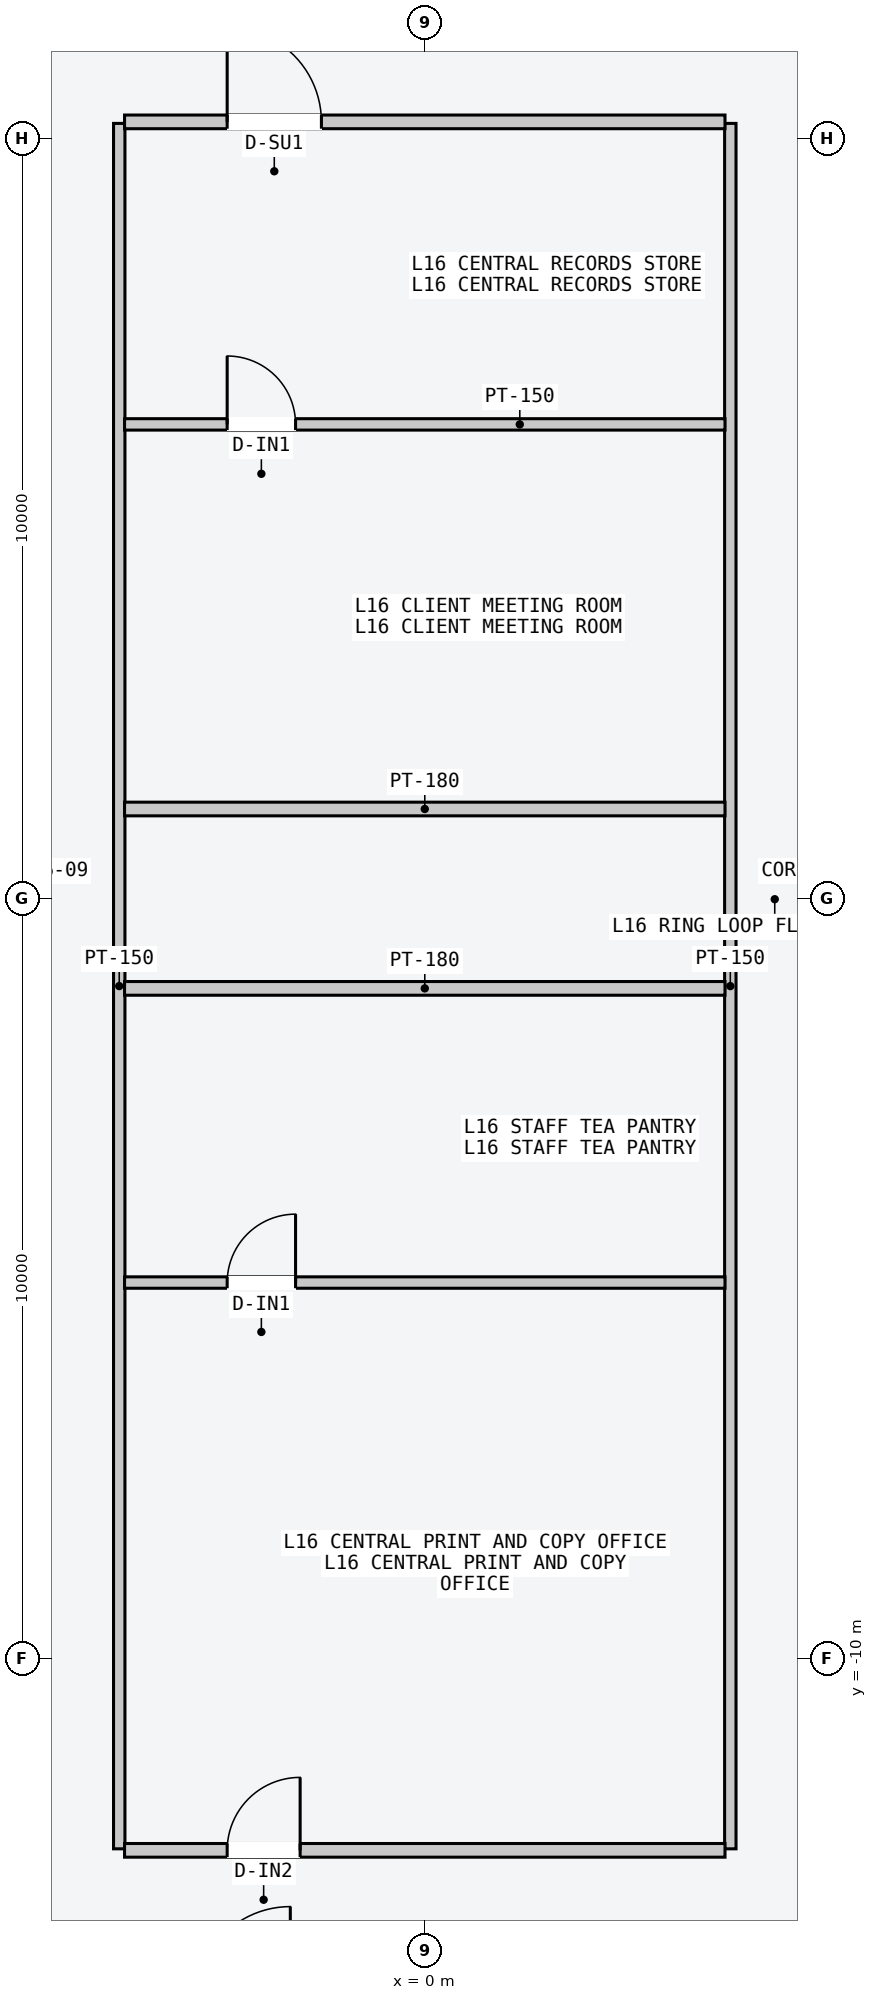
"""IFC4 building model, lengths in metres.
Left out: names, types, materials, properties, quantities, classifications, styles, units other than length and angle.
Written with IfcOpenShell. Run it as: python <this file> out.ifc"""

import sys

from ifc_helpers import new_model, si_unit, direction, frame, frame_2d, origin, place, context, subcontext, project, spatial, rectangle, extrude, element, fill, save


model = new_model("IFC4")
c1 = context("Model", 3, precision=1e-05, world=origin(), true_north=direction((0.0, 1.0)))
c2 = subcontext(c1, "Body", "Model", "MODEL_VIEW")
j1 = project(units=[si_unit("LENGTHUNIT", "METRE"), si_unit("PLANEANGLEUNIT", "RADIAN")], contexts=[c1])
p1 = place(None, origin())
s1 = spatial("IfcSite", under=j1, at=p1, CompositionType="ELEMENT")
p2 = place(p1, origin())
s2 = spatial("IfcBuilding", under=s1, at=p2, CompositionType="ELEMENT")
p3 = place(p2, frame((0.0, 0.0, 63.6)))
s3 = spatial("IfcBuildingStorey", under=s2, at=p3, CompositionType="ELEMENT", Elevation=63.6)
for number, where, z_axis, x_axis in (
    (1, (-4.02, -12.5, 0.0), (0.0, 0.0, 1.0), (0.0, 1.0, 0.0)),
    (2, (4.02, -12.5, 0.0), (0.0, 0.0, 1.0), (0.0, 1.0, 0.0)),
):
    element("IfcWall", number, at=place(p3, frame(where, z_axis=z_axis, x_axis=x_axis)), inside=s3, PredefinedType="PARTITIONING", context=c2, shape_type="SweptSolid", body=[
        extrude(rectangle(XDim=22.7, YDim=0.15, at=frame_2d((11.35, 0.0))), origin(), (0.0, 0.0, 1.0), 3.4),
    ])
p4 = place(p3, frame((-3.95, 1.18, 0.0), z_axis=(0.0, 0.0, 1.0), x_axis=(1.0, 0.0, 0.0)))
e3 = element("IfcWall", 3, at=p4, inside=s3, PredefinedType="PARTITIONING", context=c2, shape_type="SweptSolid", body=[
    extrude(rectangle(XDim=7.9, YDim=0.18, at=frame_2d((3.95, 0.0))), origin(), (0.0, 0.0, 1.0), 3.4),
])
p5 = place(p3, frame((-3.95, 10.22, 0.0), z_axis=(0.0, 0.0, 1.0), x_axis=(1.0, 0.0, 0.0)))
e4 = element("IfcWall", 4, at=p5, inside=s3, PredefinedType="PARTITIONING", context=c2, shape_type="SweptSolid", body=[
    extrude(rectangle(XDim=7.9, YDim=0.18, at=frame_2d((3.95, 0.0))), origin(), (0.0, 0.0, 1.0), 3.4),
])
p6 = place(p5, frame((1.35, 0.0, 0.0)))
e5 = element("IfcOpeningElement", 5, at=p6, cuts=e4, PredefinedType="OPENING", context=c2, shape_type="SweptSolid", body=[
    extrude(rectangle(XDim=1.24, YDim=2.24, at=frame_2d((0.62, 1.12))), frame((0.0, 0.1, 0.0), z_axis=(0.0, -1.0, 0.0), x_axis=(1.0, 0.0, 0.0)), (0.0, 0.0, 1.0), 0.2),
])
p7 = place(p3, frame((-3.95, -1.18, 0.0), z_axis=(0.0, 0.0, 1.0), x_axis=(1.0, 0.0, 0.0)))
e6 = element("IfcWall", 6, at=p7, inside=s3, PredefinedType="PARTITIONING", context=c2, shape_type="SweptSolid", body=[
    extrude(rectangle(XDim=7.9, YDim=0.18, at=frame_2d((3.95, 0.0))), origin(), (0.0, 0.0, 1.0), 3.4),
])
p8 = place(p3, frame((-3.95, -12.52, 0.0), z_axis=(0.0, 0.0, 1.0), x_axis=(1.0, 0.0, 0.0)))
e7 = element("IfcWall", 7, at=p8, inside=s3, PredefinedType="PARTITIONING", context=c2, shape_type="SweptSolid", body=[
    extrude(rectangle(XDim=7.9, YDim=0.18, at=frame_2d((3.95, 0.0))), origin(), (0.0, 0.0, 1.0), 3.4),
])
p9 = place(p8, frame((1.35, 0.0, 0.0)))
e8 = element("IfcOpeningElement", 8, at=p9, cuts=e7, PredefinedType="OPENING", context=c2, shape_type="SweptSolid", body=[
    extrude(rectangle(XDim=0.96, YDim=2.18, at=frame_2d((0.48, 1.09))), frame((0.0, 0.1, 0.0), z_axis=(0.0, -1.0, 0.0), x_axis=(1.0, 0.0, 0.0)), (0.0, 0.0, 1.0), 0.2),
])
p10 = place(p3, frame((-3.95, 6.24, 0.0), z_axis=(0.0, 0.0, 1.0), x_axis=(1.0, 0.0, 0.0)))
e9 = element("IfcWall", 9, at=p10, inside=s3, PredefinedType="PARTITIONING", context=c2, shape_type="SweptSolid", body=[
    extrude(rectangle(XDim=7.9, YDim=0.15, at=frame_2d((3.95, 0.0))), origin(), (0.0, 0.0, 1.0), 3.4),
])
p11 = place(p10, frame((1.35, 0.0, 0.0)))
e10 = element("IfcOpeningElement", 10, at=p11, cuts=e9, PredefinedType="OPENING", context=c2, shape_type="SweptSolid", body=[
    extrude(rectangle(XDim=0.9, YDim=2.15, at=frame_2d((0.45, 1.075))), frame((0.0, 0.085, 0.0), z_axis=(0.0, -1.0, 0.0), x_axis=(1.0, 0.0, 0.0)), (0.0, 0.0, 1.0), 0.17),
])
p12 = place(p3, frame((-3.95, -5.05, 0.0), z_axis=(0.0, 0.0, 1.0), x_axis=(1.0, 0.0, 0.0)))
e11 = element("IfcWall", 11, at=p12, inside=s3, PredefinedType="PARTITIONING", context=c2, shape_type="SweptSolid", body=[
    extrude(rectangle(XDim=7.9, YDim=0.15, at=frame_2d((3.95, 0.0))), origin(), (0.0, 0.0, 1.0), 3.4),
])
p13 = place(p12, frame((1.35, 0.0, 0.0)))
e12 = element("IfcOpeningElement", 12, at=p13, cuts=e11, PredefinedType="OPENING", context=c2, shape_type="SweptSolid", body=[
    extrude(rectangle(XDim=0.9, YDim=2.15, at=frame_2d((0.45, 1.075))), frame((0.0, 0.085, 0.0), z_axis=(0.0, -1.0, 0.0), x_axis=(1.0, 0.0, 0.0)), (0.0, 0.0, 1.0), 0.17),
])
p14 = place(p6, origin())
e13 = element("IfcDoor", 13, at=p14, inside=s3, OperationType="SINGLE_SWING_LEFT", PredefinedType="DOOR", context=c2, shape_type="SweptSolid", body=[
    extrude(rectangle(XDim=1.24, YDim=2.24, at=frame_2d((0.62, 1.12))), frame((0.0, 0.025, 0.0), z_axis=(0.0, -1.0, 0.0), x_axis=(1.0, 0.0, 0.0)), (0.0, 0.0, 1.0), 0.05),
])
fill(e5, e13)
p15 = place(p9, origin())
e14 = element("IfcDoor", 14, at=p15, inside=s3, OperationType="SINGLE_SWING_RIGHT", PredefinedType="DOOR", context=c2, shape_type="SweptSolid", body=[
    extrude(rectangle(XDim=0.96, YDim=2.18, at=frame_2d((0.48, 1.09))), frame((0.0, 0.025, 0.0), z_axis=(0.0, -1.0, 0.0), x_axis=(1.0, 0.0, 0.0)), (0.0, 0.0, 1.0), 0.05),
])
fill(e8, e14)
p16 = place(p11, origin())
e15 = element("IfcDoor", 15, at=p16, inside=s3, OperationType="SINGLE_SWING_LEFT", PredefinedType="DOOR", context=c2, shape_type="SweptSolid", body=[
    extrude(rectangle(XDim=0.9, YDim=2.15, at=frame_2d((0.45, 1.075))), frame((0.0, 0.025, 0.0), z_axis=(0.0, -1.0, 0.0), x_axis=(1.0, 0.0, 0.0)), (0.0, 0.0, 1.0), 0.05),
])
fill(e10, e15)
p17 = place(p13, origin())
e16 = element("IfcDoor", 16, at=p17, inside=s3, OperationType="SINGLE_SWING_RIGHT", PredefinedType="DOOR", context=c2, shape_type="SweptSolid", body=[
    extrude(rectangle(XDim=0.9, YDim=2.15, at=frame_2d((0.45, 1.075))), frame((0.0, 0.025, 0.0), z_axis=(0.0, -1.0, 0.0), x_axis=(1.0, 0.0, 0.0)), (0.0, 0.0, 1.0), 0.05),
])
fill(e12, e16)
save(model, sys.argv[1])
